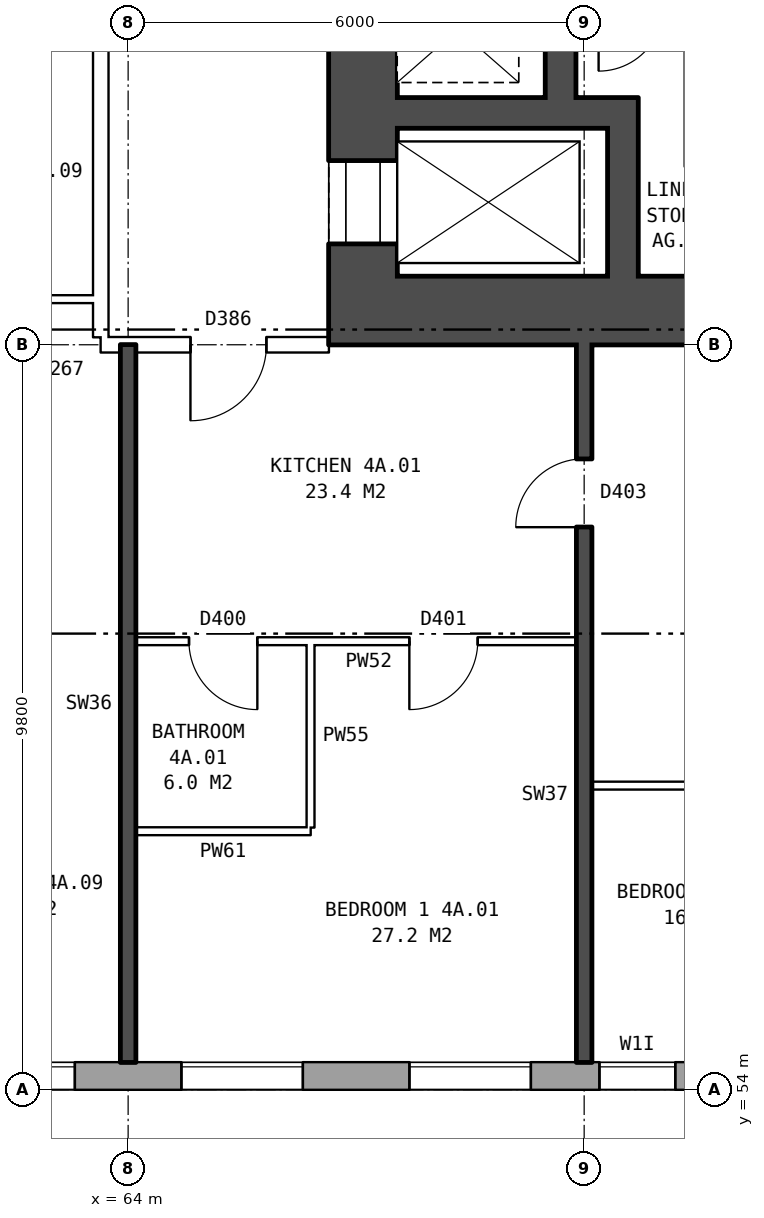
"""IFC4 building model, lengths in metres.
Left out: names, types, materials, properties, quantities, classifications, styles, units other than length and angle.
Written with IfcOpenShell. Run it as: python <this file> out.ifc"""

import sys

from ifc_helpers import new_model, si_unit, direction, frame, frame_2d, origin, place, context, subcontext, project, spatial, rectangle, extrude, element, fill, save


model = new_model("IFC4")
c1 = context("Model", 3, precision=1e-05, world=origin(), true_north=direction((0.0, 1.0)))
c2 = subcontext(c1, "Body", "Model", "MODEL_VIEW")
j1 = project(units=[si_unit("LENGTHUNIT", "METRE"), si_unit("PLANEANGLEUNIT", "RADIAN")], contexts=[c1])
p1 = place(None, origin())
s1 = spatial("IfcSite", under=j1, at=p1, CompositionType="ELEMENT")
p2 = place(p1, origin())
s2 = spatial("IfcBuilding", under=s1, at=p2, CompositionType="ELEMENT")
p3 = place(p2, frame((0.0, 0.0, 19.5)))
s3 = spatial("IfcBuildingStorey", under=s2, at=p3, CompositionType="ELEMENT", Elevation=19.5)
p4 = place(p3, frame((22.825, 54.18, 0.0), z_axis=(0.0, 0.0, 1.0), x_axis=(1.0, 0.0, 0.0)))
e1 = element("IfcWall", 1, at=p4, inside=s3, PredefinedType="STANDARD", context=c2, shape_type="SweptSolid", body=[
    extrude(rectangle(XDim=50.101, YDim=0.36, at=frame_2d((25.05, 0.0))), origin(), (0.0, 0.0, 1.0), 2.85),
])
p5 = place(p4, frame((2.875, 0.0, 0.8)))
e2 = element("IfcOpeningElement", 2, at=p5, cuts=e1, PredefinedType="OPENING", context=c2, shape_type="SweptSolid", body=[
    extrude(rectangle(XDim=1.6, YDim=1.8, at=frame_2d((0.8, 0.9))), frame((0.0, 0.19, 0.0), z_axis=(0.0, -1.0, 0.0), x_axis=(1.0, 0.0, 0.0)), (0.0, 0.0, 1.0), 0.38),
])
p6 = place(p4, frame((5.875, 0.0, 0.8)))
e3 = element("IfcOpeningElement", 3, at=p6, cuts=e1, PredefinedType="OPENING", context=c2, shape_type="SweptSolid", body=[
    extrude(rectangle(XDim=1.6, YDim=1.8, at=frame_2d((0.8, 0.9))), frame((0.0, 0.19, 0.0), z_axis=(0.0, -1.0, 0.0), x_axis=(1.0, 0.0, 0.0)), (0.0, 0.0, 1.0), 0.38),
])
p7 = place(p4, frame((8.875, 0.0, 0.8)))
e4 = element("IfcOpeningElement", 4, at=p7, cuts=e1, PredefinedType="OPENING", context=c2, shape_type="SweptSolid", body=[
    extrude(rectangle(XDim=1.6, YDim=1.8, at=frame_2d((0.8, 0.9))), frame((0.0, 0.19, 0.0), z_axis=(0.0, -1.0, 0.0), x_axis=(1.0, 0.0, 0.0)), (0.0, 0.0, 1.0), 0.38),
])
p8 = place(p4, frame((11.875, 0.0, 0.8)))
e5 = element("IfcOpeningElement", 5, at=p8, cuts=e1, PredefinedType="OPENING", context=c2, shape_type="SweptSolid", body=[
    extrude(rectangle(XDim=1.6, YDim=1.8, at=frame_2d((0.8, 0.9))), frame((0.0, 0.19, 0.0), z_axis=(0.0, -1.0, 0.0), x_axis=(1.0, 0.0, 0.0)), (0.0, 0.0, 1.0), 0.38),
])
p9 = place(p4, frame((14.875, 0.0, 0.8)))
e6 = element("IfcOpeningElement", 6, at=p9, cuts=e1, PredefinedType="OPENING", context=c2, shape_type="SweptSolid", body=[
    extrude(rectangle(XDim=1.6, YDim=1.8, at=frame_2d((0.8, 0.9))), frame((0.0, 0.19, 0.0), z_axis=(0.0, -1.0, 0.0), x_axis=(1.0, 0.0, 0.0)), (0.0, 0.0, 1.0), 0.38),
])
p10 = place(p4, frame((17.875, 0.0, 0.8)))
e7 = element("IfcOpeningElement", 7, at=p10, cuts=e1, PredefinedType="OPENING", context=c2, shape_type="SweptSolid", body=[
    extrude(rectangle(XDim=1.6, YDim=1.8, at=frame_2d((0.8, 0.9))), frame((0.0, 0.19, 0.0), z_axis=(0.0, -1.0, 0.0), x_axis=(1.0, 0.0, 0.0)), (0.0, 0.0, 1.0), 0.38),
])
p11 = place(p4, frame((20.875, 0.0, 0.8)))
e8 = element("IfcOpeningElement", 8, at=p11, cuts=e1, PredefinedType="OPENING", context=c2, shape_type="SweptSolid", body=[
    extrude(rectangle(XDim=1.6, YDim=1.8, at=frame_2d((0.8, 0.9))), frame((0.0, 0.19, 0.0), z_axis=(0.0, -1.0, 0.0), x_axis=(1.0, 0.0, 0.0)), (0.0, 0.0, 1.0), 0.38),
])
p12 = place(p4, frame((23.875, 0.0, 0.8)))
e9 = element("IfcOpeningElement", 9, at=p12, cuts=e1, PredefinedType="OPENING", context=c2, shape_type="SweptSolid", body=[
    extrude(rectangle(XDim=1.6, YDim=1.8, at=frame_2d((0.8, 0.9))), frame((0.0, 0.19, 0.0), z_axis=(0.0, -1.0, 0.0), x_axis=(1.0, 0.0, 0.0)), (0.0, 0.0, 1.0), 0.38),
])
p13 = place(p4, frame((26.875, 0.0, 0.8)))
e10 = element("IfcOpeningElement", 10, at=p13, cuts=e1, PredefinedType="OPENING", context=c2, shape_type="SweptSolid", body=[
    extrude(rectangle(XDim=1.6, YDim=1.8, at=frame_2d((0.8, 0.9))), frame((0.0, 0.19, 0.0), z_axis=(0.0, -1.0, 0.0), x_axis=(1.0, 0.0, 0.0)), (0.0, 0.0, 1.0), 0.38),
])
p14 = place(p4, frame((29.875, 0.0, 0.8)))
e11 = element("IfcOpeningElement", 11, at=p14, cuts=e1, PredefinedType="OPENING", context=c2, shape_type="SweptSolid", body=[
    extrude(rectangle(XDim=1.6, YDim=1.8, at=frame_2d((0.8, 0.9))), frame((0.0, 0.19, 0.0), z_axis=(0.0, -1.0, 0.0), x_axis=(1.0, 0.0, 0.0)), (0.0, 0.0, 1.0), 0.38),
])
p15 = place(p4, frame((32.875, 0.0, 0.8)))
e12 = element("IfcOpeningElement", 12, at=p15, cuts=e1, PredefinedType="OPENING", context=c2, shape_type="SweptSolid", body=[
    extrude(rectangle(XDim=1.6, YDim=1.8, at=frame_2d((0.8, 0.9))), frame((0.0, 0.19, 0.0), z_axis=(0.0, -1.0, 0.0), x_axis=(1.0, 0.0, 0.0)), (0.0, 0.0, 1.0), 0.38),
])
p16 = place(p4, frame((35.875, 0.0, 0.8)))
e13 = element("IfcOpeningElement", 13, at=p16, cuts=e1, PredefinedType="OPENING", context=c2, shape_type="SweptSolid", body=[
    extrude(rectangle(XDim=1.6, YDim=1.8, at=frame_2d((0.8, 0.9))), frame((0.0, 0.19, 0.0), z_axis=(0.0, -1.0, 0.0), x_axis=(1.0, 0.0, 0.0)), (0.0, 0.0, 1.0), 0.38),
])
p17 = place(p4, frame((38.875, 0.0, 0.8)))
e14 = element("IfcOpeningElement", 14, at=p17, cuts=e1, PredefinedType="OPENING", context=c2, shape_type="SweptSolid", body=[
    extrude(rectangle(XDim=1.6, YDim=1.8, at=frame_2d((0.8, 0.9))), frame((0.0, 0.19, 0.0), z_axis=(0.0, -1.0, 0.0), x_axis=(1.0, 0.0, 0.0)), (0.0, 0.0, 1.0), 0.38),
])
p18 = place(p4, frame((41.875, 0.0, 0.8)))
e15 = element("IfcOpeningElement", 15, at=p18, cuts=e1, PredefinedType="OPENING", context=c2, shape_type="SweptSolid", body=[
    extrude(rectangle(XDim=1.6, YDim=1.8, at=frame_2d((0.8, 0.9))), frame((0.0, 0.19, 0.0), z_axis=(0.0, -1.0, 0.0), x_axis=(1.0, 0.0, 0.0)), (0.0, 0.0, 1.0), 0.38),
])
p19 = place(p4, frame((44.875, 0.0, 0.8)))
e16 = element("IfcOpeningElement", 16, at=p19, cuts=e1, PredefinedType="OPENING", context=c2, shape_type="SweptSolid", body=[
    extrude(rectangle(XDim=1.6, YDim=1.8, at=frame_2d((0.8, 0.9))), frame((0.0, 0.19, 0.0), z_axis=(0.0, -1.0, 0.0), x_axis=(1.0, 0.0, 0.0)), (0.0, 0.0, 1.0), 0.38),
])
p20 = place(p4, frame((47.375, 0.0, 0.8)))
e17 = element("IfcOpeningElement", 17, at=p20, cuts=e1, PredefinedType="OPENING", context=c2, shape_type="SweptSolid", body=[
    extrude(rectangle(XDim=1.0, YDim=1.5, at=frame_2d((0.5, 0.75))), frame((0.0, 0.19, 0.0), z_axis=(0.0, -1.0, 0.0), x_axis=(1.0, 0.0, 0.0)), (0.0, 0.0, 1.0), 0.38),
])
p21 = place(p4, frame((48.675, 0.0, 0.8)))
e18 = element("IfcOpeningElement", 18, at=p21, cuts=e1, PredefinedType="OPENING", context=c2, shape_type="SweptSolid", body=[
    extrude(rectangle(XDim=0.6, YDim=0.9, at=frame_2d((0.3, 0.45))), frame((0.0, 0.19, 0.0), z_axis=(0.0, -1.0, 0.0), x_axis=(1.0, 0.0, 0.0)), (0.0, 0.0, 1.0), 0.38),
])
p22 = place(p3, frame((67.09, 64.7, 0.0), z_axis=(0.0, 0.0, 1.0), x_axis=(0.0, 1.0, 0.0)))
e19 = element("IfcWall", 19, at=p22, inside=s3, PredefinedType="SHEAR", context=c2, shape_type="SweptSolid", body=[
    extrude(rectangle(XDim=10.6, YDim=0.9, at=frame_2d((5.3, 0.0))), origin(), (0.0, 0.0, 1.0), 2.85),
])
p23 = place(p22, frame((0.425, 0.0, 0.0)))
e20 = element("IfcOpeningElement", 20, at=p23, cuts=e19, PredefinedType="OPENING", context=c2, shape_type="SweptSolid", body=[
    extrude(rectangle(XDim=1.1, YDim=2.1, at=frame_2d((0.55, 1.05))), frame((0.0, 0.46, 0.0), z_axis=(0.0, -1.0, 0.0), x_axis=(1.0, 0.0, 0.0)), (0.0, 0.0, 1.0), 0.92),
])
p24 = place(p22, frame((9.0, 0.0, 0.0)))
e21 = element("IfcOpeningElement", 21, at=p24, cuts=e19, PredefinedType="OPENING", context=c2, shape_type="SweptSolid", body=[
    extrude(rectangle(XDim=1.1, YDim=2.1, at=frame_2d((0.55, 1.05))), frame((0.0, 0.46, 0.0), z_axis=(0.0, -1.0, 0.0), x_axis=(1.0, 0.0, 0.0)), (0.0, 0.0, 1.0), 0.92),
])
p25 = place(p3, frame((66.64, 64.25, 0.0), z_axis=(0.0, 0.0, 1.0), x_axis=(1.0, 0.0, 0.0)))
e22 = element("IfcWall", 22, at=p25, inside=s3, PredefinedType="SHEAR", context=c2, shape_type="SweptSolid", body=[
    extrude(rectangle(XDim=9.0, YDim=0.9, at=frame_2d((4.5, 0.0))), origin(), (0.0, 0.0, 1.0), 2.85),
])
p26 = place(p3, frame((67.54, 66.85, 0.0), z_axis=(0.0, 0.0, 1.0), x_axis=(1.0, 0.0, 0.0)))
e23 = element("IfcWall", 23, at=p26, inside=s3, PredefinedType="SHEAR", context=c2, shape_type="SweptSolid", body=[
    extrude(rectangle(XDim=3.17, YDim=0.4, at=frame_2d((1.585, 0.0))), origin(), (0.0, 0.0, 1.0), 2.85),
])
p27 = place(p3, frame((69.69, 67.05, 0.0), z_axis=(0.0, 0.0, 1.0), x_axis=(0.0, 1.0, 0.0)))
e24 = element("IfcWall", 24, at=p27, inside=s3, PredefinedType="SHEAR", context=c2, shape_type="SweptSolid", body=[
    extrude(rectangle(XDim=6.6, YDim=0.4, at=frame_2d((3.3, 0.0))), origin(), (0.0, 0.0, 1.0), 2.85),
])
p28 = place(p3, frame((70.51, 64.7, 0.0), z_axis=(0.0, 0.0, 1.0), x_axis=(0.0, 1.0, 0.0)))
e25 = element("IfcWall", 25, at=p28, inside=s3, PredefinedType="SHEAR", context=c2, shape_type="SweptSolid", body=[
    extrude(rectangle(XDim=1.95, YDim=0.4, at=frame_2d((0.975, 0.0))), origin(), (0.0, 0.0, 1.0), 2.85),
])
p29 = place(p3, frame((63.64, 63.9, 0.0), z_axis=(0.0, 0.0, 1.0), x_axis=(0.0, 1.0, 0.0)))
e26 = element("IfcWall", 26, at=p29, inside=s3, PredefinedType="PARTITIONING", context=c2, shape_type="SweptSolid", body=[
    extrude(rectangle(XDim=12.2, YDim=0.2, at=frame_2d((6.1, 0.0))), origin(), (0.0, 0.0, 1.0), 2.85),
])
p30 = place(p29, frame((5.1, 0.0, 0.0)))
e27 = element("IfcOpeningElement", 27, at=p30, cuts=e26, PredefinedType="OPENING", context=c2, shape_type="SweptSolid", body=[
    extrude(rectangle(XDim=2.0, YDim=2.1, at=frame_2d((1.0, 1.05))), frame((0.0, 0.11, 0.0), z_axis=(0.0, -1.0, 0.0), x_axis=(1.0, 0.0, 0.0)), (0.0, 0.0, 1.0), 0.22),
])
p31 = place(p3, frame((64.1, 57.4, 0.0), z_axis=(0.0, 0.0, 1.0), x_axis=(1.0, 0.0, 0.0)))
e28 = element("IfcWall", 28, at=p31, inside=s3, PredefinedType="PARTITIONING", context=c2, shape_type="SweptSolid", body=[
    extrude(rectangle(XDim=2.3, YDim=0.1, at=frame_2d((1.15, 0.0))), origin(), (0.0, 0.0, 1.0), 2.85),
])
p32 = place(p3, frame((70.1, 58.0, 0.0), z_axis=(0.0, 0.0, 1.0), x_axis=(1.0, 0.0, 0.0)))
e29 = element("IfcWall", 29, at=p32, inside=s3, PredefinedType="PARTITIONING", context=c2, shape_type="SweptSolid", body=[
    extrude(rectangle(XDim=5.54, YDim=0.1, at=frame_2d((2.77, 0.0))), origin(), (0.0, 0.0, 1.0), 2.85),
])
p33 = place(p32, frame((2.32, 0.0, 0.0)))
e30 = element("IfcOpeningElement", 30, at=p33, cuts=e29, PredefinedType="OPENING", context=c2, shape_type="SweptSolid", body=[
    extrude(rectangle(XDim=0.9, YDim=2.1, at=frame_2d((0.45, 1.05))), frame((0.0, 0.06, 0.0), z_axis=(0.0, -1.0, 0.0), x_axis=(1.0, 0.0, 0.0)), (0.0, 0.0, 1.0), 0.12),
])
p34 = place(p3, frame((64.1, 59.9, 0.0), z_axis=(0.0, 0.0, 1.0), x_axis=(1.0, 0.0, 0.0)))
e31 = element("IfcWall", 31, at=p34, inside=s3, PredefinedType="PARTITIONING", context=c2, shape_type="SweptSolid", body=[
    extrude(rectangle(XDim=5.8, YDim=0.1, at=frame_2d((2.9, 0.0))), origin(), (0.0, 0.0, 1.0), 2.85),
])
p35 = place(p34, frame((3.6, 0.0, 0.0)))
e32 = element("IfcOpeningElement", 32, at=p35, cuts=e31, PredefinedType="OPENING", context=c2, shape_type="SweptSolid", body=[
    extrude(rectangle(XDim=0.9, YDim=2.1, at=frame_2d((0.45, 1.05))), frame((0.0, 0.06, 0.0), z_axis=(0.0, -1.0, 0.0), x_axis=(1.0, 0.0, 0.0)), (0.0, 0.0, 1.0), 0.12),
])
p36 = place(p34, frame((0.7, 0.0, 0.0)))
e33 = element("IfcOpeningElement", 33, at=p36, cuts=e31, PredefinedType="OPENING", context=c2, shape_type="SweptSolid", body=[
    extrude(rectangle(XDim=0.9, YDim=2.1, at=frame_2d((0.45, 1.05))), frame((0.0, 0.06, 0.0), z_axis=(0.0, -1.0, 0.0), x_axis=(1.0, 0.0, 0.0)), (0.0, 0.0, 1.0), 0.12),
])
p37 = place(p3, frame((63.64, 63.8, 0.0), z_axis=(0.0, 0.0, 1.0), x_axis=(1.0, 0.0, 0.0)))
e34 = element("IfcWall", 34, at=p37, inside=s3, PredefinedType="PARTITIONING", context=c2, shape_type="SweptSolid", body=[
    extrude(rectangle(XDim=3.0, YDim=0.2, at=frame_2d((1.5, 0.0))), origin(), (0.0, 0.0, 1.0), 2.85),
])
p38 = place(p37, frame((1.18, 0.0, 0.0)))
e35 = element("IfcOpeningElement", 35, at=p38, cuts=e34, PredefinedType="OPENING", context=c2, shape_type="SweptSolid", body=[
    extrude(rectangle(XDim=1.0, YDim=2.1, at=frame_2d((0.5, 1.05))), frame((0.0, 0.11, 0.0), z_axis=(0.0, -1.0, 0.0), x_axis=(1.0, 0.0, 0.0)), (0.0, 0.0, 1.0), 0.22),
])
p39 = place(p3, frame((61.0, 64.4, 0.0), z_axis=(0.0, 0.0, 1.0), x_axis=(1.0, 0.0, 0.0)))
e36 = element("IfcWall", 36, at=p39, inside=s3, PredefinedType="PARTITIONING", context=c2, shape_type="SweptSolid", body=[
    extrude(rectangle(XDim=2.64, YDim=0.1, at=frame_2d((1.32, 0.0))), origin(), (0.0, 0.0, 1.0), 2.85),
])
p40 = place(p3, frame((64.0, 54.36, 0.0), z_axis=(0.0, 0.0, 1.0), x_axis=(0.0, 1.0, 0.0)))
e37 = element("IfcWall", 37, at=p40, inside=s3, PredefinedType="SOLIDWALL", context=c2, shape_type="SweptSolid", body=[
    extrude(rectangle(XDim=9.44, YDim=0.2, at=frame_2d((4.72, 0.0))), origin(), (0.0, 0.0, 1.0), 2.85),
])
p41 = place(p3, frame((66.4, 57.45, 0.0), z_axis=(0.0, 0.0, 1.0), x_axis=(0.0, 1.0, 0.0)))
e38 = element("IfcWall", 38, at=p41, inside=s3, PredefinedType="PARTITIONING", context=c2, shape_type="SweptSolid", body=[
    extrude(rectangle(XDim=2.4, YDim=0.1, at=frame_2d((1.2, 0.0))), origin(), (0.0, 0.0, 1.0), 2.85),
])
p42 = place(p3, frame((70.0, 54.36, 0.0), z_axis=(0.0, 0.0, 1.0), x_axis=(0.0, 1.0, 0.0)))
e39 = element("IfcWall", 39, at=p42, inside=s3, PredefinedType="SOLIDWALL", context=c2, shape_type="SweptSolid", body=[
    extrude(rectangle(XDim=9.44, YDim=0.2, at=frame_2d((4.72, 0.0))), origin(), (0.0, 0.0, 1.0), 2.85),
])
p43 = place(p42, frame((7.04, 0.0, 0.0)))
e40 = element("IfcOpeningElement", 40, at=p43, cuts=e39, PredefinedType="OPENING", context=c2, shape_type="SweptSolid", body=[
    extrude(rectangle(XDim=0.9, YDim=2.1, at=frame_2d((0.45, 1.05))), frame((0.0, 0.11, 0.0), z_axis=(0.0, -1.0, 0.0), x_axis=(1.0, 0.0, 0.0)), (0.0, 0.0, 1.0), 0.22),
])
p44 = place(p17, origin())
e41 = element("IfcWindow", 41, at=p44, inside=s3, PartitioningType="SINGLE_PANEL", PredefinedType="WINDOW", context=c2, shape_type="SweptSolid", body=[
    extrude(rectangle(XDim=1.6, YDim=1.8, at=frame_2d((0.8, 0.9))), frame((0.0, 0.15, 0.0), z_axis=(0.0, -1.0, 0.0), x_axis=(1.0, 0.0, 0.0)), (0.0, 0.0, 1.0), 0.06),
])
fill(e14, e41)
p45 = place(p18, origin())
e42 = element("IfcWindow", 42, at=p45, inside=s3, PartitioningType="SINGLE_PANEL", PredefinedType="WINDOW", context=c2, shape_type="SweptSolid", body=[
    extrude(rectangle(XDim=1.6, YDim=1.8, at=frame_2d((0.8, 0.9))), frame((0.0, 0.15, 0.0), z_axis=(0.0, -1.0, 0.0), x_axis=(1.0, 0.0, 0.0)), (0.0, 0.0, 1.0), 0.06),
])
fill(e15, e42)
p46 = place(p19, origin())
e43 = element("IfcWindow", 43, at=p46, inside=s3, PartitioningType="SINGLE_PANEL", PredefinedType="WINDOW", context=c2, shape_type="SweptSolid", body=[
    extrude(rectangle(XDim=1.6, YDim=1.8, at=frame_2d((0.8, 0.9))), frame((0.0, 0.15, 0.0), z_axis=(0.0, -1.0, 0.0), x_axis=(1.0, 0.0, 0.0)), (0.0, 0.0, 1.0), 0.06),
])
fill(e16, e43)
p47 = place(p20, origin())
e44 = element("IfcWindow", 44, at=p47, inside=s3, PartitioningType="SINGLE_PANEL", PredefinedType="WINDOW", context=c2, shape_type="SweptSolid", body=[
    extrude(rectangle(XDim=1.0, YDim=1.5, at=frame_2d((0.5, 0.75))), frame((0.0, 0.15, 0.0), z_axis=(0.0, -1.0, 0.0), x_axis=(1.0, 0.0, 0.0)), (0.0, 0.0, 1.0), 0.06),
])
fill(e17, e44)
p48 = place(p23, origin())
e45 = element("IfcDoor", 45, at=p48, inside=s3, OperationType="DOUBLE_DOOR_SLIDING", PredefinedType="DOOR", context=c2, shape_type="SweptSolid", body=[
    extrude(rectangle(XDim=1.1, YDim=2.1, at=frame_2d((0.55, 1.05))), frame((0.0, -0.385, 0.0), z_axis=(0.0, -1.0, 0.0), x_axis=(1.0, 0.0, 0.0)), (0.0, 0.0, 1.0), 0.05),
])
fill(e20, e45)
p49 = place(p35, frame((0.9, 0.0, 0.0), z_axis=(0.0, 0.0, 1.0), x_axis=(-1.0, 0.0, 0.0)))
e46 = element("IfcDoor", 46, at=p49, inside=s3, OperationType="SINGLE_SWING_RIGHT", PredefinedType="DOOR", context=c2, shape_type="SweptSolid", body=[
    extrude(rectangle(XDim=0.9, YDim=2.1, at=frame_2d((0.45, 1.05))), frame((0.0, 0.025, 0.0), z_axis=(0.0, -1.0, 0.0), x_axis=(1.0, 0.0, 0.0)), (0.0, 0.0, 1.0), 0.05),
])
fill(e32, e46)
p50 = place(p38, frame((1.0, 0.0, 0.0), z_axis=(0.0, 0.0, 1.0), x_axis=(-1.0, 0.0, 0.0)))
e47 = element("IfcDoor", 47, at=p50, inside=s3, OperationType="SINGLE_SWING_RIGHT", PredefinedType="DOOR", context=c2, shape_type="SweptSolid", body=[
    extrude(rectangle(XDim=1.0, YDim=2.1, at=frame_2d((0.5, 1.05))), frame((0.0, 0.025, 0.0), z_axis=(0.0, -1.0, 0.0), x_axis=(1.0, 0.0, 0.0)), (0.0, 0.0, 1.0), 0.05),
])
fill(e35, e47)
p51 = place(p43, origin())
e48 = element("IfcDoor", 48, at=p51, inside=s3, OperationType="SINGLE_SWING_LEFT", PredefinedType="DOOR", context=c2, shape_type="SweptSolid", body=[
    extrude(rectangle(XDim=0.9, YDim=2.1, at=frame_2d((0.45, 1.05))), frame((0.0, 0.025, 0.0), z_axis=(0.0, -1.0, 0.0), x_axis=(1.0, 0.0, 0.0)), (0.0, 0.0, 1.0), 0.05),
])
fill(e40, e48)
p52 = place(p36, frame((0.9, 0.0, 0.0), z_axis=(0.0, 0.0, 1.0), x_axis=(-1.0, 0.0, 0.0)))
e49 = element("IfcDoor", 49, at=p52, inside=s3, OperationType="SINGLE_SWING_LEFT", PredefinedType="DOOR", context=c2, shape_type="SweptSolid", body=[
    extrude(rectangle(XDim=0.9, YDim=2.1, at=frame_2d((0.45, 1.05))), frame((0.0, 0.025, 0.0), z_axis=(0.0, -1.0, 0.0), x_axis=(1.0, 0.0, 0.0)), (0.0, 0.0, 1.0), 0.05),
])
fill(e33, e49)
save(model, sys.argv[1])
